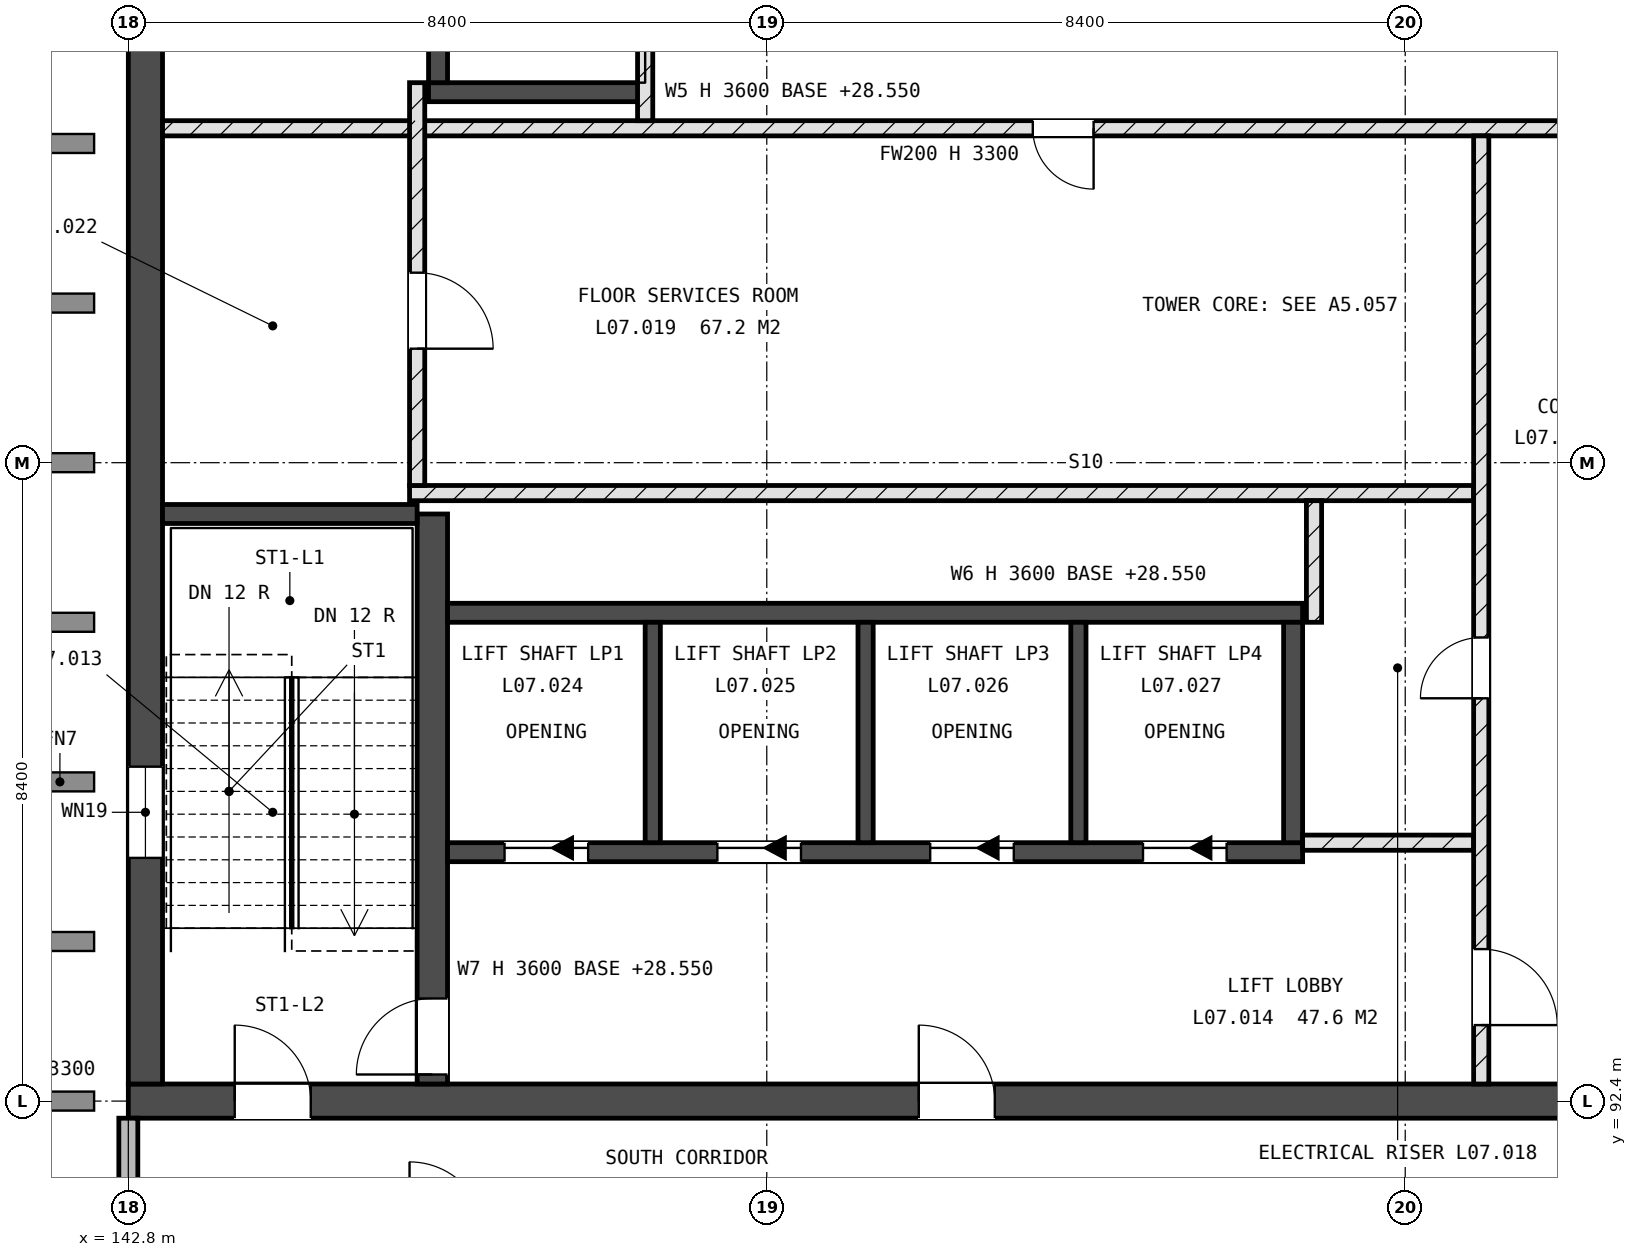
"""IFC4 building model, lengths in metres.
Left out: names, types, materials, properties, quantities, classifications, styles, units other than length and angle.
Written with IfcOpenShell. Run it as: python <this file> out.ifc"""

import sys

from ifc_helpers import new_model, si_unit, direction, frame, frame_2d, origin, place, context, subcontext, project, spatial, rectangle, extrude, element, fill, save


model = new_model("IFC4")
c1 = context("Model", 3, precision=1e-05, world=origin(), true_north=direction((0.0, 1.0)))
c2 = subcontext(c1, "Body", "Model", "MODEL_VIEW")
j1 = project(units=[si_unit("LENGTHUNIT", "METRE"), si_unit("PLANEANGLEUNIT", "RADIAN")], contexts=[c1])
p1 = place(None, origin())
s1 = spatial("IfcSite", under=j1, at=p1, CompositionType="ELEMENT")
p2 = place(p1, origin())
s2 = spatial("IfcBuilding", under=s1, at=p2, CompositionType="ELEMENT")
p3 = place(p2, frame((0.0, 0.0, 28.8)))
s3 = spatial("IfcBuildingStorey", under=s2, at=p3, CompositionType="ELEMENT", Elevation=28.8)
p4 = place(p3, frame((142.8, 92.4, -0.25), z_axis=(0.0, 0.0, 1.0), x_axis=(1.0, 0.0, 0.0)))
e1 = element("IfcWall", 1, at=p4, inside=s3, PredefinedType="SHEAR", context=c2, shape_type="SweptSolid", body=[
    extrude(rectangle(XDim=25.2, YDim=0.45, at=frame_2d((12.6, 0.0))), origin(), (0.0, 0.0, 1.0), 3.6),
])
p5 = place(p4, frame((1.4, 0.0, 0.25)))
e2 = element("IfcOpeningElement", 2, at=p5, cuts=e1, PredefinedType="OPENING", context=c2, shape_type="SweptSolid", body=[
    extrude(rectangle(XDim=1.0, YDim=2.1, at=frame_2d((0.5, 1.05))), frame((0.0, 0.235, 0.0), z_axis=(0.0, -1.0, 0.0), x_axis=(1.0, 0.0, 0.0)), (0.0, 0.0, 1.0), 0.47),
])
p6 = place(p4, frame((19.1, 0.0, 0.25)))
e3 = element("IfcOpeningElement", 3, at=p6, cuts=e1, PredefinedType="OPENING", context=c2, shape_type="SweptSolid", body=[
    extrude(rectangle(XDim=1.0, YDim=2.1, at=frame_2d((0.5, 1.05))), frame((0.0, 0.235, 0.0), z_axis=(0.0, -1.0, 0.0), x_axis=(1.0, 0.0, 0.0)), (0.0, 0.0, 1.0), 0.47),
])
p7 = place(p4, frame((10.4, 0.0, 0.25)))
e4 = element("IfcOpeningElement", 4, at=p7, cuts=e1, PredefinedType="OPENING", context=c2, shape_type="SweptSolid", body=[
    extrude(rectangle(XDim=1.0, YDim=2.1, at=frame_2d((0.5, 1.05))), frame((0.0, 0.235, 0.0), z_axis=(0.0, -1.0, 0.0), x_axis=(1.0, 0.0, 0.0)), (0.0, 0.0, 1.0), 0.47),
])
p8 = place(p3, frame((143.025, 92.625, -0.25), z_axis=(0.0, 0.0, 1.0), x_axis=(0.0, 1.0, 0.0)))
e5 = element("IfcWall", 5, at=p8, inside=s3, PredefinedType="SHEAR", context=c2, shape_type="SweptSolid", body=[
    extrude(rectangle(XDim=16.35, YDim=0.45, at=frame_2d((8.175, 0.0))), origin(), (0.0, 0.0, 1.0), 3.6),
])
p9 = place(p8, frame((2.975, 0.0, 1.85)))
e6 = element("IfcOpeningElement", 6, at=p9, cuts=e5, PredefinedType="OPENING", context=c2, shape_type="SweptSolid", body=[
    extrude(rectangle(XDim=1.2, YDim=0.9, at=frame_2d((0.6, 0.45))), frame((0.0, 0.235, 0.0), z_axis=(0.0, -1.0, 0.0), x_axis=(1.0, 0.0, 0.0)), (0.0, 0.0, 1.0), 0.47),
])
p10 = place(p3, frame((146.8, 92.625, -0.25), z_axis=(0.0, 0.0, 1.0), x_axis=(0.0, 1.0, 0.0)))
e7 = element("IfcWall", 7, at=p10, inside=s3, PredefinedType="SHEAR", context=c2, shape_type="SweptSolid", body=[
    extrude(rectangle(XDim=7.5, YDim=0.4, at=frame_2d((3.75, 0.0))), origin(), (0.0, 0.0, 1.0), 3.6),
])
p11 = place(p10, frame((0.125, 0.0, 0.25)))
e8 = element("IfcOpeningElement", 8, at=p11, cuts=e7, PredefinedType="OPENING", context=c2, shape_type="SweptSolid", body=[
    extrude(rectangle(XDim=1.0, YDim=2.1, at=frame_2d((0.5, 1.05))), frame((0.0, 0.21, 0.0), z_axis=(0.0, -1.0, 0.0), x_axis=(1.0, 0.0, 0.0)), (0.0, 0.0, 1.0), 0.42),
])
p12 = place(p3, frame((143.25, 100.125, -0.25), z_axis=(0.0, 0.0, 1.0), x_axis=(1.0, 0.0, 0.0)))
e9 = element("IfcWall", 9, at=p12, inside=s3, PredefinedType="SHEAR", context=c2, shape_type="SweptSolid", body=[
    extrude(rectangle(XDim=3.35, YDim=0.25, at=frame_2d((1.675, 0.0))), origin(), (0.0, 0.0, 1.0), 3.6),
])
p13 = place(p3, frame((147.0, 95.675, -0.25), z_axis=(0.0, 0.0, 1.0), x_axis=(1.0, 0.0, 0.0)))
e10 = element("IfcWall", 10, at=p13, inside=s3, PredefinedType="SHEAR", context=c2, shape_type="SweptSolid", body=[
    extrude(rectangle(XDim=11.25, YDim=0.25, at=frame_2d((5.625, 0.0))), origin(), (0.0, 0.0, 1.0), 3.6),
])
p14 = place(p13, frame((0.75, 0.0, 0.25)))
e11 = element("IfcOpeningElement", 11, at=p14, cuts=e10, PredefinedType="OPENING", context=c2, shape_type="SweptSolid", body=[
    extrude(rectangle(XDim=1.1, YDim=2.1, at=frame_2d((0.55, 1.05))), frame((0.0, 0.135, 0.0), z_axis=(0.0, -1.0, 0.0), x_axis=(1.0, 0.0, 0.0)), (0.0, 0.0, 1.0), 0.27),
])
p15 = place(p13, frame((3.55, 0.0, 0.25)))
e12 = element("IfcOpeningElement", 12, at=p15, cuts=e10, PredefinedType="OPENING", context=c2, shape_type="SweptSolid", body=[
    extrude(rectangle(XDim=1.1, YDim=2.1, at=frame_2d((0.55, 1.05))), frame((0.0, 0.135, 0.0), z_axis=(0.0, -1.0, 0.0), x_axis=(1.0, 0.0, 0.0)), (0.0, 0.0, 1.0), 0.27),
])
p16 = place(p13, frame((6.35, 0.0, 0.25)))
e13 = element("IfcOpeningElement", 13, at=p16, cuts=e10, PredefinedType="OPENING", context=c2, shape_type="SweptSolid", body=[
    extrude(rectangle(XDim=1.1, YDim=2.1, at=frame_2d((0.55, 1.05))), frame((0.0, 0.135, 0.0), z_axis=(0.0, -1.0, 0.0), x_axis=(1.0, 0.0, 0.0)), (0.0, 0.0, 1.0), 0.27),
])
p17 = place(p13, frame((9.15, 0.0, 0.25)))
e14 = element("IfcOpeningElement", 14, at=p17, cuts=e10, PredefinedType="OPENING", context=c2, shape_type="SweptSolid", body=[
    extrude(rectangle(XDim=1.1, YDim=2.1, at=frame_2d((0.55, 1.05))), frame((0.0, 0.135, 0.0), z_axis=(0.0, -1.0, 0.0), x_axis=(1.0, 0.0, 0.0)), (0.0, 0.0, 1.0), 0.27),
])
p18 = place(p3, frame((147.0, 98.825, -0.25), z_axis=(0.0, 0.0, 1.0), x_axis=(1.0, 0.0, 0.0)))
e15 = element("IfcWall", 15, at=p18, inside=s3, PredefinedType="SHEAR", context=c2, shape_type="SweptSolid", body=[
    extrude(rectangle(XDim=11.25, YDim=0.25, at=frame_2d((5.625, 0.0))), origin(), (0.0, 0.0, 1.0), 3.6),
])
p19 = place(p3, frame((158.125, 95.8, -0.25), z_axis=(0.0, 0.0, 1.0), x_axis=(0.0, 1.0, 0.0)))
e16 = element("IfcWall", 16, at=p19, inside=s3, PredefinedType="SHEAR", context=c2, shape_type="SweptSolid", body=[
    extrude(rectangle(XDim=2.9, YDim=0.25, at=frame_2d((1.45, 0.0))), origin(), (0.0, 0.0, 1.0), 3.6),
])
for number, where, z_axis, x_axis in (
    (17, (149.7, 95.8, -0.25), (0.0, 0.0, 1.0), (0.0, 1.0, 0.0)),
    (18, (152.5, 95.8, -0.25), (0.0, 0.0, 1.0), (0.0, 1.0, 0.0)),
    (19, (155.3, 95.8, -0.25), (0.0, 0.0, 1.0), (0.0, 1.0, 0.0)),
):
    element("IfcWall", number, at=place(p3, frame(where, z_axis=z_axis, x_axis=x_axis)), inside=s3, PredefinedType="SHEAR", context=c2, shape_type="SweptSolid", body=[
        extrude(rectangle(XDim=2.9, YDim=0.2, at=frame_2d((1.45, 0.0))), origin(), (0.0, 0.0, 1.0), 3.6),
    ])
p20 = place(p3, frame((146.75, 105.675, -0.25), z_axis=(0.0, 0.0, 1.0), x_axis=(1.0, 0.0, 0.0)))
e20 = element("IfcWall", 20, at=p20, inside=s3, PredefinedType="SHEAR", context=c2, shape_type="SweptSolid", body=[
    extrude(rectangle(XDim=2.85, YDim=0.25, at=frame_2d((1.425, 0.0))), origin(), (0.0, 0.0, 1.0), 3.6),
])
p21 = place(p3, frame((146.875, 105.8, -0.25), z_axis=(0.0, 0.0, 1.0), x_axis=(0.0, 1.0, 0.0)))
e21 = element("IfcWall", 21, at=p21, inside=s3, PredefinedType="SHEAR", context=c2, shape_type="SweptSolid", body=[
    extrude(rectangle(XDim=2.9, YDim=0.25, at=frame_2d((1.45, 0.0))), origin(), (0.0, 0.0, 1.0), 3.6),
])
p22 = place(p3, frame((142.8, 84.45, 0.0), z_axis=(0.0, 0.0, 1.0), x_axis=(0.0, 1.0, 0.0)))
e22 = element("IfcWall", 22, at=p22, inside=s3, PredefinedType="STANDARD", context=c2, shape_type="SweptSolid", body=[
    extrude(rectangle(XDim=7.725, YDim=0.25, at=frame_2d((3.863, 0.0))), origin(), (0.0, 0.0, 1.0), 3.3),
])
p23 = place(p22, frame((2.25, 0.0, 2.1)))
e23 = element("IfcOpeningElement", 23, at=p23, cuts=e22, PredefinedType="OPENING", context=c2, shape_type="SweptSolid", body=[
    extrude(rectangle(XDim=0.9, YDim=0.6, at=frame_2d((0.45, 0.3))), frame((0.0, 0.135, 0.0), z_axis=(0.0, -1.0, 0.0), x_axis=(1.0, 0.0, 0.0)), (0.0, 0.0, 1.0), 0.27),
])
p24 = place(p3, frame((158.25, 95.8, 0.0), z_axis=(0.0, 0.0, 1.0), x_axis=(1.0, 0.0, 0.0)))
e24 = element("IfcWall", 24, at=p24, inside=s3, PredefinedType="SOLIDWALL", context=c2, shape_type="SweptSolid", body=[
    extrude(rectangle(XDim=2.25, YDim=0.2, at=frame_2d((1.125, 0.0))), origin(), (0.0, 0.0, 1.0), 3.3),
])
p25 = place(p3, frame((146.5, 100.4, 0.0), z_axis=(0.0, 0.0, 1.0), x_axis=(1.0, 0.0, 0.0)))
e25 = element("IfcWall", 25, at=p25, inside=s3, PredefinedType="SOLIDWALL", context=c2, shape_type="SweptSolid", body=[
    extrude(rectangle(XDim=14.0, YDim=0.2, at=frame_2d((7.0, 0.0))), origin(), (0.0, 0.0, 1.0), 3.3),
])
p26 = place(p3, frame((143.25, 105.2, 0.0), z_axis=(0.0, 0.0, 1.0), x_axis=(1.0, 0.0, 0.0)))
e26 = element("IfcWall", 26, at=p26, inside=s3, PredefinedType="SOLIDWALL", context=c2, shape_type="SweptSolid", body=[
    extrude(rectangle(XDim=20.7, YDim=0.2, at=frame_2d((10.35, 0.0))), origin(), (0.0, 0.0, 1.0), 3.3),
])
p27 = place(p26, frame((11.45, 0.0, 0.0)))
e27 = element("IfcOpeningElement", 27, at=p27, cuts=e26, PredefinedType="OPENING", context=c2, shape_type="SweptSolid", body=[
    extrude(rectangle(XDim=0.8, YDim=2.1, at=frame_2d((0.4, 1.05))), frame((0.0, 0.11, 0.0), z_axis=(0.0, -1.0, 0.0), x_axis=(1.0, 0.0, 0.0)), (0.0, 0.0, 1.0), 0.22),
])
p28 = place(p26, frame((18.75, 0.0, 0.0)))
e28 = element("IfcOpeningElement", 28, at=p28, cuts=e26, PredefinedType="OPENING", context=c2, shape_type="SweptSolid", body=[
    extrude(rectangle(XDim=1.0, YDim=2.1, at=frame_2d((0.5, 1.05))), frame((0.0, 0.11, 0.0), z_axis=(0.0, -1.0, 0.0), x_axis=(1.0, 0.0, 0.0)), (0.0, 0.0, 1.0), 0.22),
])
p29 = place(p3, frame((146.6, 100.5, 0.0), z_axis=(0.0, 0.0, 1.0), x_axis=(0.0, 1.0, 0.0)))
e29 = element("IfcWall", 29, at=p29, inside=s3, PredefinedType="SOLIDWALL", context=c2, shape_type="SweptSolid", body=[
    extrude(rectangle(XDim=5.3, YDim=0.2, at=frame_2d((2.65, 0.0))), origin(), (0.0, 0.0, 1.0), 3.3),
])
p30 = place(p29, frame((1.8, 0.0, 0.0)))
e30 = element("IfcOpeningElement", 30, at=p30, cuts=e29, PredefinedType="OPENING", context=c2, shape_type="SweptSolid", body=[
    extrude(rectangle(XDim=1.0, YDim=2.1, at=frame_2d((0.5, 1.05))), frame((0.0, 0.11, 0.0), z_axis=(0.0, -1.0, 0.0), x_axis=(1.0, 0.0, 0.0)), (0.0, 0.0, 1.0), 0.22),
])
p31 = place(p3, frame((149.6, 105.3, 0.0), z_axis=(0.0, 0.0, 1.0), x_axis=(0.0, 1.0, 0.0)))
e31 = element("IfcWall", 31, at=p31, inside=s3, PredefinedType="SOLIDWALL", context=c2, shape_type="SweptSolid", body=[
    extrude(rectangle(XDim=3.675, YDim=0.2, at=frame_2d((1.837, 0.0))), origin(), (0.0, 0.0, 1.0), 3.3),
])
p32 = place(p31, frame((1.4, 0.0, 0.0)))
e32 = element("IfcOpeningElement", 32, at=p32, cuts=e31, PredefinedType="OPENING", context=c2, shape_type="SweptSolid", body=[
    extrude(rectangle(XDim=1.1, YDim=2.1, at=frame_2d((0.55, 1.05))), frame((0.0, 0.11, 0.0), z_axis=(0.0, -1.0, 0.0), x_axis=(1.0, 0.0, 0.0)), (0.0, 0.0, 1.0), 0.22),
])
p33 = place(p3, frame((158.4, 98.7, 0.0), z_axis=(0.0, 0.0, 1.0), x_axis=(0.0, 1.0, 0.0)))
e33 = element("IfcWall", 33, at=p33, inside=s3, PredefinedType="SOLIDWALL", context=c2, shape_type="SweptSolid", body=[
    extrude(rectangle(XDim=1.6, YDim=0.2, at=frame_2d((0.8, 0.0))), origin(), (0.0, 0.0, 1.0), 3.3),
])
p34 = place(p3, frame((160.6, 92.625, 0.0), z_axis=(0.0, 0.0, 1.0), x_axis=(0.0, 1.0, 0.0)))
e34 = element("IfcWall", 34, at=p34, inside=s3, PredefinedType="SOLIDWALL", context=c2, shape_type="SweptSolid", body=[
    extrude(rectangle(XDim=12.475, YDim=0.2, at=frame_2d((6.238, 0.0))), origin(), (0.0, 0.0, 1.0), 3.3),
])
p35 = place(p34, frame((5.075, 0.0, 0.0)))
e35 = element("IfcOpeningElement", 35, at=p35, cuts=e34, PredefinedType="OPENING", context=c2, shape_type="SweptSolid", body=[
    extrude(rectangle(XDim=0.8, YDim=2.1, at=frame_2d((0.4, 1.05))), frame((0.0, 0.11, 0.0), z_axis=(0.0, -1.0, 0.0), x_axis=(1.0, 0.0, 0.0)), (0.0, 0.0, 1.0), 0.22),
])
p36 = place(p34, frame((0.775, 0.0, 0.0)))
e36 = element("IfcOpeningElement", 36, at=p36, cuts=e34, PredefinedType="OPENING", context=c2, shape_type="SweptSolid", body=[
    extrude(rectangle(XDim=1.0, YDim=2.1, at=frame_2d((0.5, 1.05))), frame((0.0, 0.11, 0.0), z_axis=(0.0, -1.0, 0.0), x_axis=(1.0, 0.0, 0.0)), (0.0, 0.0, 1.0), 0.22),
])
p37 = place(p9, origin())
e37 = element("IfcWindow", 37, at=p37, inside=s3, PartitioningType="SINGLE_PANEL", PredefinedType="WINDOW", context=c2, shape_type="SweptSolid", body=[
    extrude(rectangle(XDim=1.2, YDim=0.9, at=frame_2d((0.6, 0.45))), frame((0.0, 0.03, 0.0), z_axis=(0.0, -1.0, 0.0), x_axis=(1.0, 0.0, 0.0)), (0.0, 0.0, 1.0), 0.06),
])
fill(e6, e37)
p38 = place(p14, origin())
e38 = element("IfcDoor", 38, at=p38, inside=s3, OperationType="SLIDING_TO_LEFT", PredefinedType="DOOR", context=c2, shape_type="SweptSolid", body=[
    extrude(rectangle(XDim=1.1, YDim=2.1, at=frame_2d((0.55, 1.05))), frame((0.0, 0.025, 0.0), z_axis=(0.0, -1.0, 0.0), x_axis=(1.0, 0.0, 0.0)), (0.0, 0.0, 1.0), 0.05),
])
fill(e11, e38)
p39 = place(p15, origin())
e39 = element("IfcDoor", 39, at=p39, inside=s3, OperationType="SLIDING_TO_LEFT", PredefinedType="DOOR", context=c2, shape_type="SweptSolid", body=[
    extrude(rectangle(XDim=1.1, YDim=2.1, at=frame_2d((0.55, 1.05))), frame((0.0, 0.025, 0.0), z_axis=(0.0, -1.0, 0.0), x_axis=(1.0, 0.0, 0.0)), (0.0, 0.0, 1.0), 0.05),
])
fill(e12, e39)
p40 = place(p16, origin())
e40 = element("IfcDoor", 40, at=p40, inside=s3, OperationType="SLIDING_TO_LEFT", PredefinedType="DOOR", context=c2, shape_type="SweptSolid", body=[
    extrude(rectangle(XDim=1.1, YDim=2.1, at=frame_2d((0.55, 1.05))), frame((0.0, 0.025, 0.0), z_axis=(0.0, -1.0, 0.0), x_axis=(1.0, 0.0, 0.0)), (0.0, 0.0, 1.0), 0.05),
])
fill(e13, e40)
p41 = place(p17, origin())
e41 = element("IfcDoor", 41, at=p41, inside=s3, OperationType="SLIDING_TO_LEFT", PredefinedType="DOOR", context=c2, shape_type="SweptSolid", body=[
    extrude(rectangle(XDim=1.1, YDim=2.1, at=frame_2d((0.55, 1.05))), frame((0.0, 0.025, 0.0), z_axis=(0.0, -1.0, 0.0), x_axis=(1.0, 0.0, 0.0)), (0.0, 0.0, 1.0), 0.05),
])
fill(e14, e41)
p42 = place(p5, origin())
e42 = element("IfcDoor", 42, at=p42, inside=s3, OperationType="SINGLE_SWING_RIGHT", PredefinedType="DOOR", context=c2, shape_type="SweptSolid", body=[
    extrude(rectangle(XDim=1.0, YDim=2.1, at=frame_2d((0.5, 1.05))), frame((0.0, 0.025, 0.0), z_axis=(0.0, -1.0, 0.0), x_axis=(1.0, 0.0, 0.0)), (0.0, 0.0, 1.0), 0.05),
])
fill(e2, e42)
p43 = place(p11, origin())
e43 = element("IfcDoor", 43, at=p43, inside=s3, OperationType="SINGLE_SWING_RIGHT", PredefinedType="DOOR", context=c2, shape_type="SweptSolid", body=[
    extrude(rectangle(XDim=1.0, YDim=2.1, at=frame_2d((0.5, 1.05))), frame((0.0, 0.025, 0.0), z_axis=(0.0, -1.0, 0.0), x_axis=(1.0, 0.0, 0.0)), (0.0, 0.0, 1.0), 0.05),
])
fill(e8, e43)
p44 = place(p35, origin())
e44 = element("IfcDoor", 44, at=p44, inside=s3, OperationType="SINGLE_SWING_RIGHT", PredefinedType="DOOR", context=c2, shape_type="SweptSolid", body=[
    extrude(rectangle(XDim=0.8, YDim=2.1, at=frame_2d((0.4, 1.05))), frame((0.0, 0.025, 0.0), z_axis=(0.0, -1.0, 0.0), x_axis=(1.0, 0.0, 0.0)), (0.0, 0.0, 1.0), 0.05),
])
fill(e35, e44)
p45 = place(p27, origin())
e45 = element("IfcDoor", 45, at=p45, inside=s3, OperationType="SINGLE_SWING_RIGHT", PredefinedType="DOOR", context=c2, shape_type="SweptSolid", body=[
    extrude(rectangle(XDim=0.8, YDim=2.1, at=frame_2d((0.4, 1.05))), frame((0.0, 0.025, 0.0), z_axis=(0.0, -1.0, 0.0), x_axis=(1.0, 0.0, 0.0)), (0.0, 0.0, 1.0), 0.05),
])
fill(e27, e45)
p46 = place(p30, origin())
e46 = element("IfcDoor", 46, at=p46, inside=s3, OperationType="SINGLE_SWING_LEFT", PredefinedType="DOOR", context=c2, shape_type="SweptSolid", body=[
    extrude(rectangle(XDim=1.0, YDim=2.1, at=frame_2d((0.5, 1.05))), frame((0.0, 0.025, 0.0), z_axis=(0.0, -1.0, 0.0), x_axis=(1.0, 0.0, 0.0)), (0.0, 0.0, 1.0), 0.05),
])
fill(e30, e46)
p47 = place(p7, origin())
e47 = element("IfcDoor", 47, at=p47, inside=s3, OperationType="SINGLE_SWING_RIGHT", PredefinedType="DOOR", context=c2, shape_type="SweptSolid", body=[
    extrude(rectangle(XDim=1.0, YDim=2.1, at=frame_2d((0.5, 1.05))), frame((0.0, 0.025, 0.0), z_axis=(0.0, -1.0, 0.0), x_axis=(1.0, 0.0, 0.0)), (0.0, 0.0, 1.0), 0.05),
])
fill(e4, e47)
p48 = place(p36, origin())
e48 = element("IfcDoor", 48, at=p48, inside=s3, OperationType="SINGLE_SWING_LEFT", PredefinedType="DOOR", context=c2, shape_type="SweptSolid", body=[
    extrude(rectangle(XDim=1.0, YDim=2.1, at=frame_2d((0.5, 1.05))), frame((0.0, 0.025, 0.0), z_axis=(0.0, -1.0, 0.0), x_axis=(1.0, 0.0, 0.0)), (0.0, 0.0, 1.0), 0.05),
])
fill(e36, e48)
save(model, sys.argv[1])
